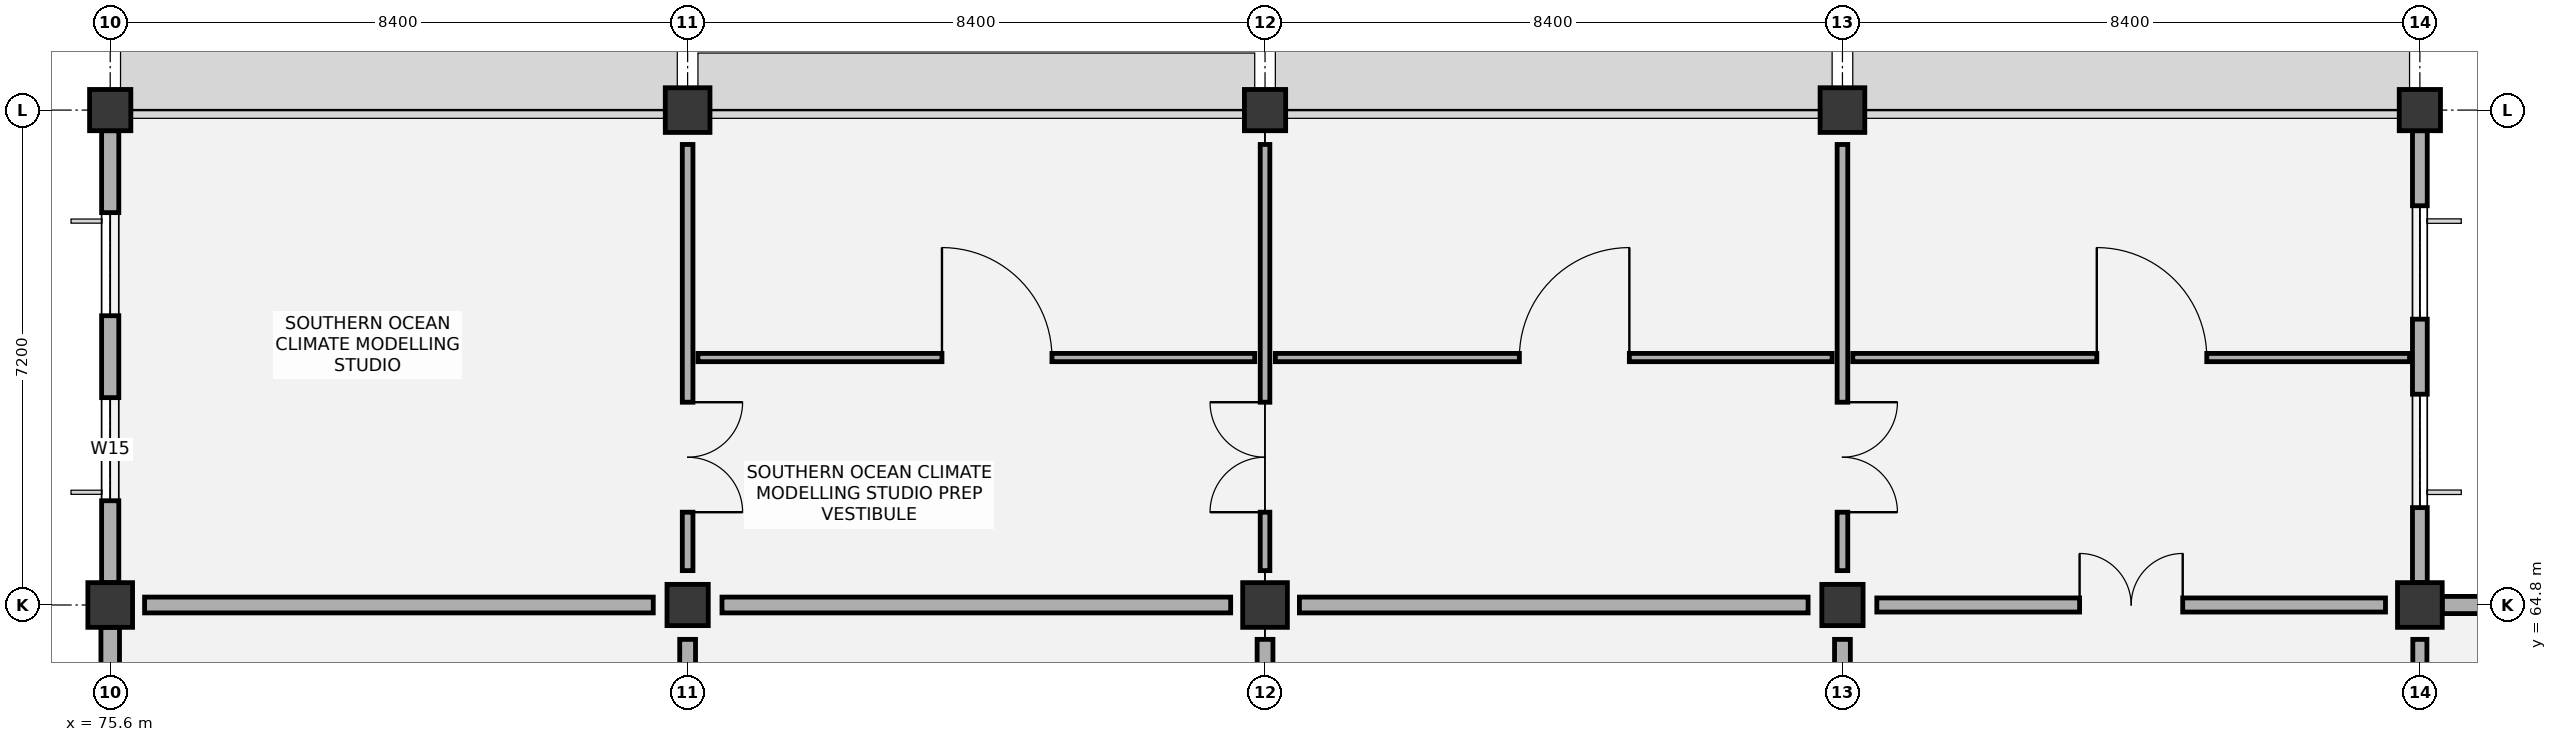
"""IFC4 building model, lengths in metres.
Left out: names, types, materials, properties, quantities, classifications, styles, units other than length and angle.
Written with IfcOpenShell. Run it as: python <this file> out.ifc"""

import sys

from ifc_helpers import new_model, si_unit, direction, frame, frame_2d, origin, origin_2d, place, context, subcontext, project, spatial, rectangle, extrude, element, fill, save


model = new_model("IFC4")
c1 = context("Model", 3, precision=1e-05, world=origin(), true_north=direction((0.0, 1.0)))
c2 = subcontext(c1, "Body", "Model", "MODEL_VIEW")
j1 = project(units=[si_unit("LENGTHUNIT", "METRE"), si_unit("PLANEANGLEUNIT", "RADIAN")], contexts=[c1])
p1 = place(None, origin())
s1 = spatial("IfcSite", under=j1, at=p1, CompositionType="ELEMENT")
p2 = place(p1, origin())
s2 = spatial("IfcBuilding", under=s1, at=p2, CompositionType="ELEMENT")
p3 = place(p2, frame((0.0, 0.0, 56.4)))
s3 = spatial("IfcBuildingStorey", under=s2, at=p3, CompositionType="ELEMENT", Elevation=56.4)
p4 = place(p3, frame((75.6, 64.8, 0.0), z_axis=(0.0, 0.0, 1.0), x_axis=(1.0, 0.0, 0.0)))
e1 = element("IfcColumn", 1, at=p4, inside=s3, PredefinedType="COLUMN", context=c2, shape_type="SweptSolid", body=[
    extrude(rectangle(XDim=0.65, YDim=0.65, at=origin_2d()), origin(), (0.0, 0.0, 1.0), 4.2),
])
for number, where, z_axis, x_axis in (
    (2, (75.6, 72.0, 0.0), (0.0, 0.0, 1.0), (1.0, 0.0, 0.0)),
    (3, (84.0, 64.8, 0.0), (0.0, 0.0, 1.0), (1.0, 0.0, 0.0)),
):
    element("IfcColumn", number, at=place(p3, frame(where, z_axis=z_axis, x_axis=x_axis)), inside=s3, PredefinedType="COLUMN", context=c2, shape_type="SweptSolid", body=[
        extrude(rectangle(XDim=0.6, YDim=0.6, at=origin_2d()), origin(), (0.0, 0.0, 1.0), 4.2),
    ])
for number, where, z_axis, x_axis in (
    (4, (84.0, 72.0, 0.0), (0.0, 0.0, 1.0), (1.0, 0.0, 0.0)),
    (5, (92.4, 64.8, 0.0), (0.0, 0.0, 1.0), (1.0, 0.0, 0.0)),
):
    element("IfcColumn", number, at=place(p3, frame(where, z_axis=z_axis, x_axis=x_axis)), inside=s3, PredefinedType="COLUMN", context=c2, shape_type="SweptSolid", body=[
        extrude(rectangle(XDim=0.65, YDim=0.65, at=origin_2d()), origin(), (0.0, 0.0, 1.0), 4.2),
    ])
for number, where, z_axis, x_axis in (
    (6, (92.4, 72.0, 0.0), (0.0, 0.0, 1.0), (1.0, 0.0, 0.0)),
    (7, (100.8, 64.8, 0.0), (0.0, 0.0, 1.0), (1.0, 0.0, 0.0)),
):
    element("IfcColumn", number, at=place(p3, frame(where, z_axis=z_axis, x_axis=x_axis)), inside=s3, PredefinedType="COLUMN", context=c2, shape_type="SweptSolid", body=[
        extrude(rectangle(XDim=0.6, YDim=0.6, at=origin_2d()), origin(), (0.0, 0.0, 1.0), 4.2),
    ])
for number, where, z_axis, x_axis in (
    (8, (100.8, 72.0, 0.0), (0.0, 0.0, 1.0), (1.0, 0.0, 0.0)),
    (9, (109.2, 64.8, 0.0), (0.0, 0.0, 1.0), (1.0, 0.0, 0.0)),
):
    element("IfcColumn", number, at=place(p3, frame(where, z_axis=z_axis, x_axis=x_axis)), inside=s3, PredefinedType="COLUMN", context=c2, shape_type="SweptSolid", body=[
        extrude(rectangle(XDim=0.65, YDim=0.65, at=origin_2d()), origin(), (0.0, 0.0, 1.0), 4.2),
    ])
p5 = place(p3, frame((109.2, 72.0, 0.0), z_axis=(0.0, 0.0, 1.0), x_axis=(1.0, 0.0, 0.0)))
e10 = element("IfcColumn", 10, at=p5, inside=s3, PredefinedType="COLUMN", context=c2, shape_type="SweptSolid", body=[
    extrude(rectangle(XDim=0.6, YDim=0.6, at=origin_2d()), origin(), (0.0, 0.0, 1.0), 4.2),
])
p6 = place(p3, frame((75.6, 57.9, 0.0), z_axis=(0.0, 0.0, 1.0), x_axis=(0.0, 1.0, 0.0)))
e11 = element("IfcWall", 11, at=p6, inside=s3, PredefinedType="SOLIDWALL", context=c2, shape_type="SweptSolid", body=[
    extrude(rectangle(XDim=6.575, YDim=0.27, at=frame_2d((3.288, 0.0))), origin(), (0.0, 0.0, 1.0), 3.365),
])
p7 = place(p6, frame((1.092, 0.0, 0.95)))
e12 = element("IfcOpeningElement", 12, at=p7, cuts=e11, PredefinedType="OPENING", context=c2, shape_type="SweptSolid", body=[
    extrude(rectangle(XDim=1.65, YDim=1.65, at=frame_2d((0.825, 0.825))), frame((0.0, 0.145, 0.0), z_axis=(0.0, -1.0, 0.0), x_axis=(1.0, 0.0, 0.0)), (0.0, 0.0, 1.0), 0.29),
])
p8 = place(p6, frame((3.833, 0.0, 0.95)))
e13 = element("IfcOpeningElement", 13, at=p8, cuts=e11, PredefinedType="OPENING", context=c2, shape_type="SweptSolid", body=[
    extrude(rectangle(XDim=1.65, YDim=1.65, at=frame_2d((0.825, 0.825))), frame((0.0, 0.145, 0.0), z_axis=(0.0, -1.0, 0.0), x_axis=(1.0, 0.0, 0.0)), (0.0, 0.0, 1.0), 0.29),
])
p9 = place(p3, frame((75.6, 65.125, 0.0), z_axis=(0.0, 0.0, 1.0), x_axis=(0.0, 1.0, 0.0)))
e14 = element("IfcWall", 14, at=p9, inside=s3, PredefinedType="SOLIDWALL", context=c2, shape_type="SweptSolid", body=[
    extrude(rectangle(XDim=6.575, YDim=0.25, at=frame_2d((3.288, 0.0))), origin(), (0.0, 0.0, 1.0), 3.365),
])
p10 = place(p9, frame((1.192, 0.0, 0.95)))
e15 = element("IfcOpeningElement", 15, at=p10, cuts=e14, PredefinedType="OPENING", context=c2, shape_type="SweptSolid", body=[
    extrude(rectangle(XDim=1.5, YDim=1.5, at=frame_2d((0.75, 0.75))), frame((0.0, 0.135, 0.0), z_axis=(0.0, -1.0, 0.0), x_axis=(1.0, 0.0, 0.0)), (0.0, 0.0, 1.0), 0.27),
])
p11 = place(p9, frame((3.883, 0.0, 0.95)))
e16 = element("IfcOpeningElement", 16, at=p11, cuts=e14, PredefinedType="OPENING", context=c2, shape_type="SweptSolid", body=[
    extrude(rectangle(XDim=1.5, YDim=1.5, at=frame_2d((0.75, 0.75))), frame((0.0, 0.135, 0.0), z_axis=(0.0, -1.0, 0.0), x_axis=(1.0, 0.0, 0.0)), (0.0, 0.0, 1.0), 0.27),
])
p12 = place(p3, frame((109.2, 65.125, 0.0), z_axis=(0.0, 0.0, 1.0), x_axis=(0.0, 1.0, 0.0)))
e17 = element("IfcWall", 17, at=p12, inside=s3, PredefinedType="SOLIDWALL", context=c2, shape_type="SweptSolid", body=[
    extrude(rectangle(XDim=6.575, YDim=0.215, at=frame_2d((3.288, 0.0))), origin(), (0.0, 0.0, 1.0), 3.365),
])
p13 = place(p12, frame((1.092, 0.0, 0.95)))
e18 = element("IfcOpeningElement", 18, at=p13, cuts=e17, PredefinedType="OPENING", context=c2, shape_type="SweptSolid", body=[
    extrude(rectangle(XDim=1.65, YDim=1.65, at=frame_2d((0.825, 0.825))), frame((0.0, 0.117, 0.0), z_axis=(0.0, -1.0, 0.0), x_axis=(1.0, 0.0, 0.0)), (0.0, 0.0, 1.0), 0.235),
])
p14 = place(p12, frame((3.833, 0.0, 0.95)))
e19 = element("IfcOpeningElement", 19, at=p14, cuts=e17, PredefinedType="OPENING", context=c2, shape_type="SweptSolid", body=[
    extrude(rectangle(XDim=1.65, YDim=1.65, at=frame_2d((0.825, 0.825))), frame((0.0, 0.117, 0.0), z_axis=(0.0, -1.0, 0.0), x_axis=(1.0, 0.0, 0.0)), (0.0, 0.0, 1.0), 0.235),
])
p15 = place(p3, frame((109.525, 64.8, 0.0), z_axis=(0.0, 0.0, 1.0), x_axis=(1.0, 0.0, 0.0)))
e20 = element("IfcWall", 20, at=p15, inside=s3, PredefinedType="SOLIDWALL", context=c2, shape_type="SweptSolid", body=[
    extrude(rectangle(XDim=7.775, YDim=0.25, at=frame_2d((3.888, 0.0))), origin(), (0.0, 0.0, 1.0), 3.295),
])
p16 = place(p15, frame((1.592, 0.0, 0.95)))
e21 = element("IfcOpeningElement", 21, at=p16, cuts=e20, PredefinedType="OPENING", context=c2, shape_type="SweptSolid", body=[
    extrude(rectangle(XDim=1.5, YDim=1.5, at=frame_2d((0.75, 0.75))), frame((0.0, 0.135, 0.0), z_axis=(0.0, -1.0, 0.0), x_axis=(1.0, 0.0, 0.0)), (0.0, 0.0, 1.0), 0.27),
])
p17 = place(p15, frame((4.683, 0.0, 0.95)))
e22 = element("IfcOpeningElement", 22, at=p17, cuts=e20, PredefinedType="OPENING", context=c2, shape_type="SweptSolid", body=[
    extrude(rectangle(XDim=1.5, YDim=1.5, at=frame_2d((0.75, 0.75))), frame((0.0, 0.135, 0.0), z_axis=(0.0, -1.0, 0.0), x_axis=(1.0, 0.0, 0.0)), (0.0, 0.0, 1.0), 0.27),
])
p18 = place(p3, frame((84.15, 68.4, 0.0), z_axis=(0.0, 0.0, 1.0), x_axis=(1.0, 0.0, 0.0)))
e23 = element("IfcWall", 23, at=p18, inside=s3, PredefinedType="PARTITIONING", context=c2, shape_type="SweptSolid", body=[
    extrude(rectangle(XDim=8.1, YDim=0.12, at=frame_2d((4.05, 0.0))), origin(), (0.0, 0.0, 1.0), 3.92),
])
p19 = place(p18, frame((3.55, 0.0, 0.0)))
e24 = element("IfcOpeningElement", 24, at=p19, cuts=e23, PredefinedType="OPENING", context=c2, shape_type="SweptSolid", body=[
    extrude(rectangle(XDim=1.6, YDim=2.2, at=frame_2d((0.8, 1.1))), frame((0.0, 0.07, 0.0), z_axis=(0.0, -1.0, 0.0), x_axis=(1.0, 0.0, 0.0)), (0.0, 0.0, 1.0), 0.14),
])
p20 = place(p3, frame((92.55, 68.4, 0.0), z_axis=(0.0, 0.0, 1.0), x_axis=(1.0, 0.0, 0.0)))
e25 = element("IfcWall", 25, at=p20, inside=s3, PredefinedType="PARTITIONING", context=c2, shape_type="SweptSolid", body=[
    extrude(rectangle(XDim=8.1, YDim=0.12, at=frame_2d((4.05, 0.0))), origin(), (0.0, 0.0, 1.0), 3.92),
])
p21 = place(p20, frame((3.55, 0.0, 0.0)))
e26 = element("IfcOpeningElement", 26, at=p21, cuts=e25, PredefinedType="OPENING", context=c2, shape_type="SweptSolid", body=[
    extrude(rectangle(XDim=1.6, YDim=2.2, at=frame_2d((0.8, 1.1))), frame((0.0, 0.07, 0.0), z_axis=(0.0, -1.0, 0.0), x_axis=(1.0, 0.0, 0.0)), (0.0, 0.0, 1.0), 0.14),
])
p22 = place(p3, frame((100.95, 68.4, 0.0), z_axis=(0.0, 0.0, 1.0), x_axis=(1.0, 0.0, 0.0)))
e27 = element("IfcWall", 27, at=p22, inside=s3, PredefinedType="PARTITIONING", context=c2, shape_type="SweptSolid", body=[
    extrude(rectangle(XDim=8.1, YDim=0.12, at=frame_2d((4.05, 0.0))), origin(), (0.0, 0.0, 1.0), 3.92),
])
p23 = place(p22, frame((3.55, 0.0, 0.0)))
e28 = element("IfcOpeningElement", 28, at=p23, cuts=e27, PredefinedType="OPENING", context=c2, shape_type="SweptSolid", body=[
    extrude(rectangle(XDim=1.6, YDim=2.2, at=frame_2d((0.8, 1.1))), frame((0.0, 0.07, 0.0), z_axis=(0.0, -1.0, 0.0), x_axis=(1.0, 0.0, 0.0)), (0.0, 0.0, 1.0), 0.14),
])
p24 = place(p3, frame((84.0, 58.1, 0.0), z_axis=(0.0, 0.0, 1.0), x_axis=(0.0, 1.0, 0.0)))
e29 = element("IfcWall", 29, at=p24, inside=s3, PredefinedType="PARTITIONING", context=c2, shape_type="SweptSolid", body=[
    extrude(rectangle(XDim=6.2, YDim=0.23, at=frame_2d((3.1, 0.0))), origin(), (0.0, 0.0, 1.0), 3.515),
])
p25 = place(p24, frame((0.25, 0.0, 0.0)))
e30 = element("IfcOpeningElement", 30, at=p25, cuts=e29, PredefinedType="OPENING", context=c2, shape_type="SweptSolid", body=[
    extrude(rectangle(XDim=1.05, YDim=2.15, at=frame_2d((0.525, 1.075))), frame((0.0, 0.125, 0.0), z_axis=(0.0, -1.0, 0.0), x_axis=(1.0, 0.0, 0.0)), (0.0, 0.0, 1.0), 0.25),
])
p26 = place(p3, frame((76.1, 64.8, 0.0), z_axis=(0.0, 0.0, 1.0), x_axis=(1.0, 0.0, 0.0)))
e31 = element("IfcWall", 31, at=p26, inside=s3, PredefinedType="PARTITIONING", context=c2, shape_type="SweptSolid", body=[
    extrude(rectangle(XDim=7.4, YDim=0.23, at=frame_2d((3.7, 0.0))), origin(), (0.0, 0.0, 1.0), 3.415),
])
p27 = place(p3, frame((84.0, 65.3, 0.0), z_axis=(0.0, 0.0, 1.0), x_axis=(0.0, 1.0, 0.0)))
e32 = element("IfcWall", 32, at=p27, inside=s3, PredefinedType="PARTITIONING", context=c2, shape_type="SweptSolid", body=[
    extrude(rectangle(XDim=6.2, YDim=0.155, at=frame_2d((3.1, 0.0))), origin(), (0.0, 0.0, 1.0), 3.415),
])
p28 = place(p27, frame((0.85, 0.0, 0.0)))
e33 = element("IfcOpeningElement", 33, at=p28, cuts=e32, PredefinedType="OPENING", context=c2, shape_type="SweptSolid", body=[
    extrude(rectangle(XDim=1.6, YDim=2.2, at=frame_2d((0.8, 1.1))), frame((0.0, 0.087, 0.0), z_axis=(0.0, -1.0, 0.0), x_axis=(1.0, 0.0, 0.0)), (0.0, 0.0, 1.0), 0.175),
])
p29 = place(p3, frame((92.4, 58.1, 0.0), z_axis=(0.0, 0.0, 1.0), x_axis=(0.0, 1.0, 0.0)))
e34 = element("IfcWall", 34, at=p29, inside=s3, PredefinedType="PARTITIONING", context=c2, shape_type="SweptSolid", body=[
    extrude(rectangle(XDim=6.2, YDim=0.23, at=frame_2d((3.1, 0.0))), origin(), (0.0, 0.0, 1.0), 3.415),
])
p30 = place(p29, frame((0.25, 0.0, 0.0)))
e35 = element("IfcOpeningElement", 35, at=p30, cuts=e34, PredefinedType="OPENING", context=c2, shape_type="SweptSolid", body=[
    extrude(rectangle(XDim=1.05, YDim=2.15, at=frame_2d((0.525, 1.075))), frame((0.0, 0.125, 0.0), z_axis=(0.0, -1.0, 0.0), x_axis=(1.0, 0.0, 0.0)), (0.0, 0.0, 1.0), 0.25),
])
p31 = place(p3, frame((84.5, 64.8, 0.0), z_axis=(0.0, 0.0, 1.0), x_axis=(1.0, 0.0, 0.0)))
e36 = element("IfcWall", 36, at=p31, inside=s3, PredefinedType="PARTITIONING", context=c2, shape_type="SweptSolid", body=[
    extrude(rectangle(XDim=7.4, YDim=0.23, at=frame_2d((3.7, 0.0))), origin(), (0.0, 0.0, 1.0), 3.415),
])
p32 = place(p3, frame((92.4, 65.3, 0.0), z_axis=(0.0, 0.0, 1.0), x_axis=(0.0, 1.0, 0.0)))
e37 = element("IfcWall", 37, at=p32, inside=s3, PredefinedType="PARTITIONING", context=c2, shape_type="SweptSolid", body=[
    extrude(rectangle(XDim=6.2, YDim=0.14, at=frame_2d((3.1, 0.0))), origin(), (0.0, 0.0, 1.0), 3.625),
])
p33 = place(p32, frame((0.85, 0.0, 0.0)))
e38 = element("IfcOpeningElement", 38, at=p33, cuts=e37, PredefinedType="OPENING", context=c2, shape_type="SweptSolid", body=[
    extrude(rectangle(XDim=1.6, YDim=2.2, at=frame_2d((0.8, 1.1))), frame((0.0, 0.08, 0.0), z_axis=(0.0, -1.0, 0.0), x_axis=(1.0, 0.0, 0.0)), (0.0, 0.0, 1.0), 0.16),
])
p34 = place(p3, frame((100.8, 58.1, 0.0), z_axis=(0.0, 0.0, 1.0), x_axis=(0.0, 1.0, 0.0)))
e39 = element("IfcWall", 39, at=p34, inside=s3, PredefinedType="PARTITIONING", context=c2, shape_type="SweptSolid", body=[
    extrude(rectangle(XDim=6.2, YDim=0.23, at=frame_2d((3.1, 0.0))), origin(), (0.0, 0.0, 1.0), 3.625),
])
p35 = place(p3, frame((92.9, 64.8, 0.0), z_axis=(0.0, 0.0, 1.0), x_axis=(1.0, 0.0, 0.0)))
e40 = element("IfcWall", 40, at=p35, inside=s3, PredefinedType="PARTITIONING", context=c2, shape_type="SweptSolid", body=[
    extrude(rectangle(XDim=7.4, YDim=0.23, at=frame_2d((3.7, 0.0))), origin(), (0.0, 0.0, 1.0), 3.415),
])
p36 = place(p3, frame((100.8, 65.3, 0.0), z_axis=(0.0, 0.0, 1.0), x_axis=(0.0, 1.0, 0.0)))
e41 = element("IfcWall", 41, at=p36, inside=s3, PredefinedType="PARTITIONING", context=c2, shape_type="SweptSolid", body=[
    extrude(rectangle(XDim=6.2, YDim=0.155, at=frame_2d((3.1, 0.0))), origin(), (0.0, 0.0, 1.0), 3.415),
])
p37 = place(p36, frame((0.85, 0.0, 0.0)))
e42 = element("IfcOpeningElement", 42, at=p37, cuts=e41, PredefinedType="OPENING", context=c2, shape_type="SweptSolid", body=[
    extrude(rectangle(XDim=1.6, YDim=2.2, at=frame_2d((0.8, 1.1))), frame((0.0, 0.087, 0.0), z_axis=(0.0, -1.0, 0.0), x_axis=(1.0, 0.0, 0.0)), (0.0, 0.0, 1.0), 0.175),
])
p38 = place(p3, frame((109.2, 58.1, 0.0), z_axis=(0.0, 0.0, 1.0), x_axis=(0.0, 1.0, 0.0)))
e43 = element("IfcWall", 43, at=p38, inside=s3, PredefinedType="PARTITIONING", context=c2, shape_type="SweptSolid", body=[
    extrude(rectangle(XDim=6.2, YDim=0.205, at=frame_2d((3.1, 0.0))), origin(), (0.0, 0.0, 1.0), 3.345),
])
p39 = place(p38, frame((2.475, 0.0, 0.0)))
e44 = element("IfcOpeningElement", 44, at=p39, cuts=e43, PredefinedType="OPENING", context=c2, shape_type="SweptSolid", body=[
    extrude(rectangle(XDim=1.25, YDim=2.1, at=frame_2d((0.625, 1.05))), frame((0.0, 0.113, 0.0), z_axis=(0.0, -1.0, 0.0), x_axis=(1.0, 0.0, 0.0)), (0.0, 0.0, 1.0), 0.225),
])
p40 = place(p3, frame((101.3, 64.8, 0.0), z_axis=(0.0, 0.0, 1.0), x_axis=(1.0, 0.0, 0.0)))
e45 = element("IfcWall", 45, at=p40, inside=s3, PredefinedType="PARTITIONING", context=c2, shape_type="SweptSolid", body=[
    extrude(rectangle(XDim=7.4, YDim=0.205, at=frame_2d((3.7, 0.0))), origin(), (0.0, 0.0, 1.0), 3.415),
])
p41 = place(p40, frame((2.95, 0.0, 0.0)))
e46 = element("IfcOpeningElement", 46, at=p41, cuts=e45, PredefinedType="OPENING", context=c2, shape_type="SweptSolid", body=[
    extrude(rectangle(XDim=1.5, YDim=2.2, at=frame_2d((0.75, 1.1))), frame((0.0, 0.113, 0.0), z_axis=(0.0, -1.0, 0.0), x_axis=(1.0, 0.0, 0.0)), (0.0, 0.0, 1.0), 0.225),
])
p42 = place(p10, origin())
e47 = element("IfcWindow", 47, at=p42, inside=s3, PartitioningType="SINGLE_PANEL", PredefinedType="WINDOW", context=c2, shape_type="SweptSolid", body=[
    extrude(rectangle(XDim=1.5, YDim=1.5, at=frame_2d((0.75, 0.75))), frame((0.0, 0.03, 0.0), z_axis=(0.0, -1.0, 0.0), x_axis=(1.0, 0.0, 0.0)), (0.0, 0.0, 1.0), 0.06),
])
fill(e15, e47)
p43 = place(p11, origin())
e48 = element("IfcWindow", 48, at=p43, inside=s3, PartitioningType="SINGLE_PANEL", PredefinedType="WINDOW", context=c2, shape_type="SweptSolid", body=[
    extrude(rectangle(XDim=1.5, YDim=1.5, at=frame_2d((0.75, 0.75))), frame((0.0, 0.03, 0.0), z_axis=(0.0, -1.0, 0.0), x_axis=(1.0, 0.0, 0.0)), (0.0, 0.0, 1.0), 0.06),
])
fill(e16, e48)
p44 = place(p13, origin())
e49 = element("IfcWindow", 49, at=p44, inside=s3, PartitioningType="SINGLE_PANEL", PredefinedType="WINDOW", context=c2, shape_type="SweptSolid", body=[
    extrude(rectangle(XDim=1.65, YDim=1.65, at=frame_2d((0.825, 0.825))), frame((0.0, 0.03, 0.0), z_axis=(0.0, -1.0, 0.0), x_axis=(1.0, 0.0, 0.0)), (0.0, 0.0, 1.0), 0.06),
])
fill(e18, e49)
p45 = place(p14, origin())
e50 = element("IfcWindow", 50, at=p45, inside=s3, PartitioningType="SINGLE_PANEL", PredefinedType="WINDOW", context=c2, shape_type="SweptSolid", body=[
    extrude(rectangle(XDim=1.65, YDim=1.65, at=frame_2d((0.825, 0.825))), frame((0.0, 0.03, 0.0), z_axis=(0.0, -1.0, 0.0), x_axis=(1.0, 0.0, 0.0)), (0.0, 0.0, 1.0), 0.06),
])
fill(e19, e50)
p46 = place(p19, origin())
e51 = element("IfcDoor", 51, at=p46, inside=s3, OperationType="SINGLE_SWING_LEFT", PredefinedType="DOOR", context=c2, shape_type="SweptSolid", body=[
    extrude(rectangle(XDim=1.6, YDim=2.2, at=frame_2d((0.8, 1.1))), frame((0.0, 0.025, 0.0), z_axis=(0.0, -1.0, 0.0), x_axis=(1.0, 0.0, 0.0)), (0.0, 0.0, 1.0), 0.05),
])
fill(e24, e51)
p47 = place(p21, origin())
e52 = element("IfcDoor", 52, at=p47, inside=s3, OperationType="SINGLE_SWING_RIGHT", PredefinedType="DOOR", context=c2, shape_type="SweptSolid", body=[
    extrude(rectangle(XDim=1.6, YDim=2.2, at=frame_2d((0.8, 1.1))), frame((0.0, 0.025, 0.0), z_axis=(0.0, -1.0, 0.0), x_axis=(1.0, 0.0, 0.0)), (0.0, 0.0, 1.0), 0.05),
])
fill(e26, e52)
p48 = place(p23, origin())
e53 = element("IfcDoor", 53, at=p48, inside=s3, OperationType="SINGLE_SWING_LEFT", PredefinedType="DOOR", context=c2, shape_type="SweptSolid", body=[
    extrude(rectangle(XDim=1.6, YDim=2.2, at=frame_2d((0.8, 1.1))), frame((0.0, 0.025, 0.0), z_axis=(0.0, -1.0, 0.0), x_axis=(1.0, 0.0, 0.0)), (0.0, 0.0, 1.0), 0.05),
])
fill(e28, e53)
p49 = place(p28, frame((1.6, 0.0, 0.0), z_axis=(0.0, 0.0, 1.0), x_axis=(-1.0, 0.0, 0.0)))
e54 = element("IfcDoor", 54, at=p49, inside=s3, OperationType="DOUBLE_DOOR_SINGLE_SWING", PredefinedType="DOOR", context=c2, shape_type="SweptSolid", body=[
    extrude(rectangle(XDim=1.6, YDim=2.2, at=frame_2d((0.8, 1.1))), frame((0.0, 0.025, 0.0), z_axis=(0.0, -1.0, 0.0), x_axis=(1.0, 0.0, 0.0)), (0.0, 0.0, 1.0), 0.05),
])
fill(e33, e54)
p50 = place(p33, origin())
e55 = element("IfcDoor", 55, at=p50, inside=s3, OperationType="DOUBLE_DOOR_SINGLE_SWING", PredefinedType="DOOR", context=c2, shape_type="SweptSolid", body=[
    extrude(rectangle(XDim=1.6, YDim=2.2, at=frame_2d((0.8, 1.1))), frame((0.0, 0.025, 0.0), z_axis=(0.0, -1.0, 0.0), x_axis=(1.0, 0.0, 0.0)), (0.0, 0.0, 1.0), 0.05),
])
fill(e38, e55)
p51 = place(p37, frame((1.6, 0.0, 0.0), z_axis=(0.0, 0.0, 1.0), x_axis=(-1.0, 0.0, 0.0)))
e56 = element("IfcDoor", 56, at=p51, inside=s3, OperationType="DOUBLE_DOOR_SINGLE_SWING", PredefinedType="DOOR", context=c2, shape_type="SweptSolid", body=[
    extrude(rectangle(XDim=1.6, YDim=2.2, at=frame_2d((0.8, 1.1))), frame((0.0, 0.025, 0.0), z_axis=(0.0, -1.0, 0.0), x_axis=(1.0, 0.0, 0.0)), (0.0, 0.0, 1.0), 0.05),
])
fill(e42, e56)
p52 = place(p41, origin())
e57 = element("IfcDoor", 57, at=p52, inside=s3, OperationType="DOUBLE_DOOR_SINGLE_SWING", PredefinedType="DOOR", context=c2, shape_type="SweptSolid", body=[
    extrude(rectangle(XDim=1.5, YDim=2.2, at=frame_2d((0.75, 1.1))), frame((0.0, 0.025, 0.0), z_axis=(0.0, -1.0, 0.0), x_axis=(1.0, 0.0, 0.0)), (0.0, 0.0, 1.0), 0.05),
])
fill(e46, e57)
save(model, sys.argv[1])
